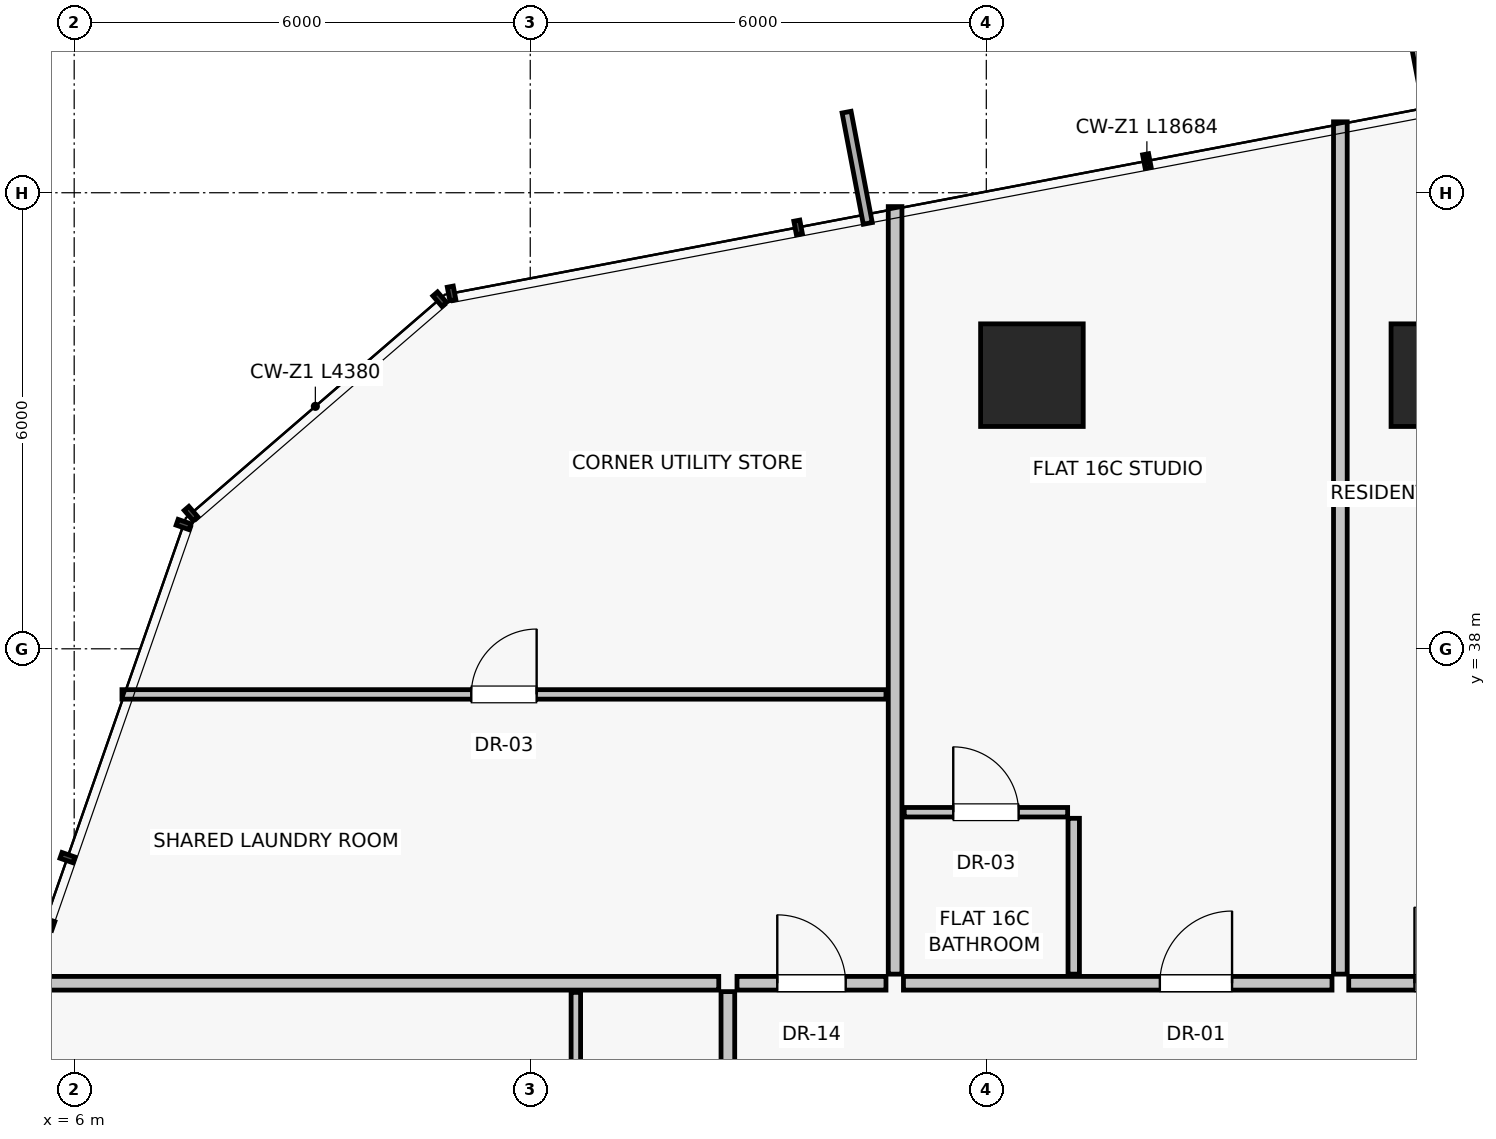
"""IFC4 building model, lengths in metres.
Left out: names, types, materials, properties, quantities, classifications, styles, units other than length and angle.
Written with IfcOpenShell. Run it as: python <this file> out.ifc"""

import sys

from ifc_helpers import new_model, si_unit, direction, frame, frame_2d, origin, origin_2d, place, context, subcontext, project, spatial, rectangle, extrude, source, transform, mapped, element, fill, save


model = new_model("IFC4")
c1 = context("Model", 3, precision=1e-05, world=origin(), true_north=direction((0.0, 1.0)))
c2 = subcontext(c1, "Body", "Model", "MODEL_VIEW")
j1 = project(units=[si_unit("LENGTHUNIT", "METRE"), si_unit("PLANEANGLEUNIT", "RADIAN")], contexts=[c1])
p1 = place(None, origin())
s1 = spatial("IfcSite", under=j1, at=p1, CompositionType="ELEMENT")
p2 = place(p1, origin())
s2 = spatial("IfcBuilding", under=s1, at=p2, CompositionType="ELEMENT")
p3 = place(p2, frame((0.0, 0.0, 60.85)))
s3 = spatial("IfcBuildingStorey", under=s2, at=p3, CompositionType="ELEMENT", Elevation=60.85)
for number, where, z_axis, x_axis in (
    (1, (24.0, 41.6, 0.0), (0.0, 0.0, 1.0), (1.0, 0.0, 0.0)),
    (2, (18.6, 41.6, 0.0), (0.0, 0.0, 1.0), (1.0, 0.0, 0.0)),
):
    element("IfcColumn", number, at=place(p3, frame(where, z_axis=z_axis, x_axis=x_axis)), inside=s3, PredefinedType="COLUMN", context=c2, shape_type="SweptSolid", body=[
        extrude(rectangle(XDim=1.35, YDim=1.35, at=origin_2d()), origin(), (0.0, 0.0, 1.0), 3.25),
    ])
p4 = place(p3, frame((16.8, 33.72, 0.0), z_axis=(0.0, 0.0, 1.0), x_axis=(0.0, 1.0, 0.0)))
e3 = element("IfcWall", 3, at=p4, inside=s3, PredefinedType="PARTITIONING", context=c2, shape_type="SweptSolid", body=[
    extrude(rectangle(XDim=10.098, YDim=0.18, at=frame_2d((5.049, 0.0))), origin(), (0.0, 0.0, 1.0), 3.0),
])
p5 = place(p3, frame((22.768, 33.6, 0.0), z_axis=(0.0, 0.0, 1.0), x_axis=(1.0, 0.0, 0.0)))
e4 = element("IfcWall", 4, at=p5, inside=s3, PredefinedType="PARTITIONING", context=c2, shape_type="SweptSolid", body=[
    extrude(rectangle(XDim=2.73, YDim=0.18, at=frame_2d((1.365, 0.0))), origin(), (0.0, 0.0, 1.0), 3.0),
])
p6 = place(p5, frame((0.865, 0.0, 0.0)))
e5 = element("IfcOpeningElement", 5, at=p6, cuts=e4, PredefinedType="OPENING", context=c2, shape_type="SweptSolid", body=[
    extrude(rectangle(XDim=1.0, YDim=2.01, at=frame_2d((0.5, 1.005))), frame((0.0, 0.1, 0.0), z_axis=(0.0, -1.0, 0.0), x_axis=(1.0, 0.0, 0.0)), (0.0, 0.0, 1.0), 0.2),
])
p7 = place(p3, frame((22.658, 33.72, 0.0), z_axis=(0.0, 0.0, 1.0), x_axis=(0.0, 1.0, 0.0)))
e6 = element("IfcWall", 6, at=p7, inside=s3, PredefinedType="PARTITIONING", context=c2, shape_type="SweptSolid", body=[
    extrude(rectangle(XDim=11.213, YDim=0.18, at=frame_2d((5.606, 0.0))), origin(), (0.0, 0.0, 1.0), 3.0),
])
p8 = place(p3, frame((16.91, 33.6, 0.0), z_axis=(0.0, 0.0, 1.0), x_axis=(1.0, 0.0, 0.0)))
e7 = element("IfcWall", 7, at=p8, inside=s3, PredefinedType="PARTITIONING", context=c2, shape_type="SweptSolid", body=[
    extrude(rectangle(XDim=5.638, YDim=0.18, at=frame_2d((2.819, 0.0))), origin(), (0.0, 0.0, 1.0), 3.0),
])
p9 = place(p8, frame((3.373, 0.0, 0.0)))
e8 = element("IfcOpeningElement", 8, at=p9, cuts=e7, PredefinedType="OPENING", context=c2, shape_type="SweptSolid", body=[
    extrude(rectangle(XDim=0.95, YDim=2.02, at=frame_2d((0.475, 1.01))), frame((0.0, 0.1, 0.0), z_axis=(0.0, -1.0, 0.0), x_axis=(1.0, 0.0, 0.0)), (0.0, 0.0, 1.0), 0.2),
])
p10 = place(p3, frame((19.15, 33.72, 0.0), z_axis=(0.0, 0.0, 1.0), x_axis=(0.0, 1.0, 0.0)))
e9 = element("IfcWall", 9, at=p10, inside=s3, PredefinedType="PARTITIONING", context=c2, shape_type="SweptSolid", body=[
    extrude(rectangle(XDim=2.05, YDim=0.15, at=frame_2d((1.025, 0.0))), origin(), (0.0, 0.0, 1.0), 3.0),
])
p11 = place(p3, frame((16.92, 35.85, 0.0), z_axis=(0.0, 0.0, 1.0), x_axis=(1.0, 0.0, 0.0)))
e10 = element("IfcWall", 10, at=p11, inside=s3, PredefinedType="PARTITIONING", context=c2, shape_type="SweptSolid", body=[
    extrude(rectangle(XDim=2.15, YDim=0.125, at=frame_2d((1.075, 0.0))), origin(), (0.0, 0.0, 1.0), 3.0),
])
p12 = place(p11, frame((0.645, 0.0, 0.0)))
e11 = element("IfcOpeningElement", 11, at=p12, cuts=e10, PredefinedType="OPENING", context=c2, shape_type="SweptSolid", body=[
    extrude(rectangle(XDim=0.86, YDim=2.01, at=frame_2d((0.43, 1.005))), frame((0.0, 0.073, 0.0), z_axis=(0.0, -1.0, 0.0), x_axis=(1.0, 0.0, 0.0)), (0.0, 0.0, 1.0), 0.145),
])
p13 = place(p3, frame((14.48, 33.6, 0.0), z_axis=(0.0, 0.0, 1.0), x_axis=(-1.0, 0.0, 0.0)))
e12 = element("IfcWall", 12, at=p13, inside=s3, PredefinedType="PARTITIONING", context=c2, shape_type="SweptSolid", body=[
    extrude(rectangle(XDim=9.176, YDim=0.18, at=frame_2d((4.588, 0.0))), origin(), (0.0, 0.0, 1.0), 3.0),
])
p14 = place(p3, frame((14.6, 25.968, 0.0), z_axis=(0.0, 0.0, 1.0), x_axis=(0.0, 1.0, 0.0)))
e13 = element("IfcWall", 13, at=p14, inside=s3, PredefinedType="PARTITIONING", context=c2, shape_type="SweptSolid", body=[
    extrude(rectangle(XDim=7.522, YDim=0.18, at=frame_2d((3.761, 0.0))), origin(), (0.0, 0.0, 1.0), 3.0),
])
p15 = place(p14, frame((2.64, 0.0, 0.0)))
e14 = element("IfcOpeningElement", 14, at=p15, cuts=e13, PredefinedType="OPENING", context=c2, shape_type="SweptSolid", body=[
    extrude(rectangle(XDim=0.95, YDim=2.02, at=frame_2d((0.475, 1.01))), frame((0.0, 0.1, 0.0), z_axis=(0.0, -1.0, 0.0), x_axis=(1.0, 0.0, 0.0)), (0.0, 0.0, 1.0), 0.2),
])
p16 = place(p3, frame((12.6, 30.158, 0.0), z_axis=(0.0, 0.0, 1.0), x_axis=(0.0, 1.0, 0.0)))
e15 = element("IfcWall", 15, at=p16, inside=s3, PredefinedType="PARTITIONING", context=c2, shape_type="SweptSolid", body=[
    extrude(rectangle(XDim=3.322, YDim=0.125, at=frame_2d((1.661, 0.0))), origin(), (0.0, 0.0, 1.0), 3.0),
])
p17 = place(p3, frame((14.72, 33.6, 0.0), z_axis=(0.0, 0.0, 1.0), x_axis=(1.0, 0.0, 0.0)))
e16 = element("IfcWall", 16, at=p17, inside=s3, PredefinedType="PARTITIONING", context=c2, shape_type="SweptSolid", body=[
    extrude(rectangle(XDim=1.96, YDim=0.18, at=frame_2d((0.98, 0.0))), origin(), (0.0, 0.0, 1.0), 3.0),
])
p18 = place(p17, frame((0.53, 0.0, 0.0)))
e17 = element("IfcOpeningElement", 17, at=p18, cuts=e16, PredefinedType="OPENING", context=c2, shape_type="SweptSolid", body=[
    extrude(rectangle(XDim=0.9, YDim=2.01, at=frame_2d((0.45, 1.005))), frame((0.0, 0.1, 0.0), z_axis=(0.0, -1.0, 0.0), x_axis=(1.0, 0.0, 0.0)), (0.0, 0.0, 1.0), 0.2),
])
p19 = place(p3, frame((6.628, 37.4, 0.0), z_axis=(0.0, 0.0, 1.0), x_axis=(1.0, 0.0, 0.0)))
e18 = element("IfcWall", 18, at=p19, inside=s3, PredefinedType="PARTITIONING", context=c2, shape_type="SweptSolid", body=[
    extrude(rectangle(XDim=10.052, YDim=0.125, at=frame_2d((5.026, 0.0))), origin(), (0.0, 0.0, 1.0), 3.0),
])
p20 = place(p19, frame((4.596, 0.0, 0.0)))
e19 = element("IfcOpeningElement", 19, at=p20, cuts=e18, PredefinedType="OPENING", context=c2, shape_type="SweptSolid", body=[
    extrude(rectangle(XDim=0.86, YDim=2.01, at=frame_2d((0.43, 1.005))), frame((0.0, 0.073, 0.0), z_axis=(0.0, -1.0, 0.0), x_axis=(1.0, 0.0, 0.0)), (0.0, 0.0, 1.0), 0.145),
])
m1 = source(origin(), c2, "Body", "SweptSolid", [
    extrude(rectangle(XDim=1.0, YDim=2.01, at=frame_2d((0.5, 1.005))), frame((0.0, 0.025, 0.0), z_axis=(0.0, -1.0, 0.0), x_axis=(1.0, 0.0, 0.0)), (0.0, 0.0, 1.0), 0.05),
])
p21 = place(p6, origin())
e20 = element("IfcDoor", 20, at=p21, inside=s3, OperationType="SINGLE_SWING_LEFT", PredefinedType="DOOR", context=c2, shape_type="MappedRepresentation", body=[
    mapped(m1, transform((0.0, 0.0, 0.0), scale=1.0)),
])
fill(e5, e20)
m2 = source(origin(), c2, "Body", "SweptSolid", [
    extrude(rectangle(XDim=0.95, YDim=2.02, at=frame_2d((0.475, 1.01))), frame((0.0, 0.025, 0.0), z_axis=(0.0, -1.0, 0.0), x_axis=(1.0, 0.0, 0.0)), (0.0, 0.0, 1.0), 0.05),
])
p22 = place(p9, origin())
e21 = element("IfcDoor", 21, at=p22, inside=s3, OperationType="SINGLE_SWING_RIGHT", PredefinedType="DOOR", context=c2, shape_type="MappedRepresentation", body=[
    mapped(m2, transform((0.0, 0.0, 0.0), scale=1.0)),
])
fill(e8, e21)
m3 = source(origin(), c2, "Body", "SweptSolid", [
    extrude(rectangle(XDim=0.86, YDim=2.01, at=frame_2d((0.43, 1.005))), frame((0.0, 0.025, 0.0), z_axis=(0.0, -1.0, 0.0), x_axis=(1.0, 0.0, 0.0)), (0.0, 0.0, 1.0), 0.05),
])
p23 = place(p12, origin())
e22 = element("IfcDoor", 22, at=p23, inside=s3, OperationType="SINGLE_SWING_LEFT", PredefinedType="DOOR", context=c2, shape_type="MappedRepresentation", body=[
    mapped(m3, transform((0.0, 0.0, 0.0), scale=1.0)),
])
fill(e11, e22)
m4 = source(origin(), c2, "Body", "SweptSolid", [
    extrude(rectangle(XDim=0.9, YDim=2.01, at=frame_2d((0.45, 1.005))), frame((0.0, 0.025, 0.0), z_axis=(0.0, -1.0, 0.0), x_axis=(1.0, 0.0, 0.0)), (0.0, 0.0, 1.0), 0.05),
])
p24 = place(p18, origin())
e23 = element("IfcDoor", 23, at=p24, inside=s3, OperationType="SINGLE_SWING_LEFT", PredefinedType="DOOR", context=c2, shape_type="MappedRepresentation", body=[
    mapped(m4, transform((0.0, 0.0, 0.0), scale=1.0)),
])
fill(e17, e23)
p25 = place(p20, origin())
e24 = element("IfcDoor", 24, at=p25, inside=s3, OperationType="SINGLE_SWING_RIGHT", PredefinedType="DOOR", context=c2, shape_type="MappedRepresentation", body=[
    mapped(m3, transform((0.0, 0.0, 0.0), scale=1.0)),
])
fill(e19, e24)
save(model, sys.argv[1])
